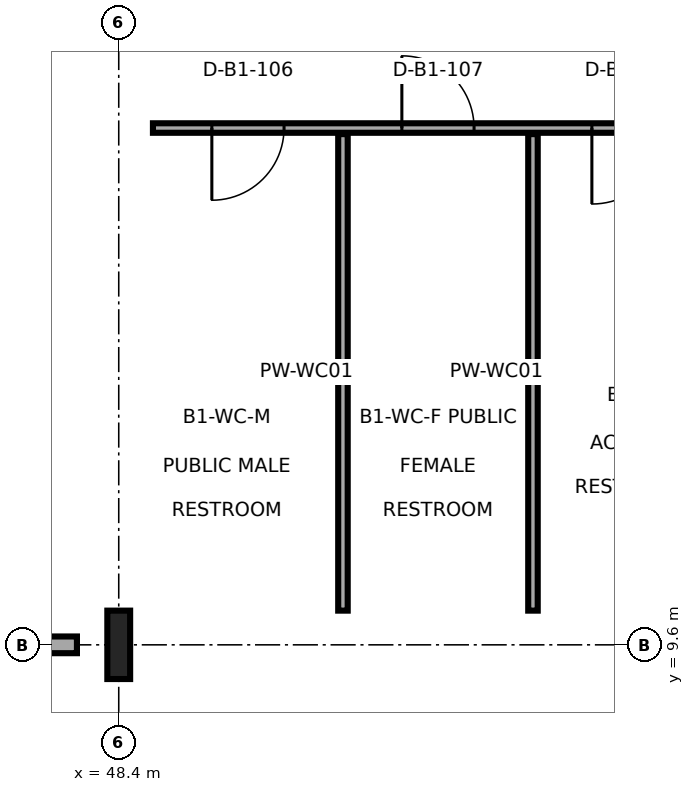
"""IFC4 building model, lengths in metres.
Left out: names, types, materials, properties, quantities, classifications, styles, units other than length and angle.
Written with IfcOpenShell. Run it as: python <this file> out.ifc"""

import sys

from ifc_helpers import new_model, si_unit, direction, frame, frame_2d, origin, origin_2d, place, context, subcontext, project, spatial, rectangle, i_section, extrude, element, fill, save


model = new_model("IFC4")
c1 = context("Model", 3, precision=1e-05, world=origin(), true_north=direction((0.0, 1.0)))
c2 = subcontext(c1, "Body", "Model", "MODEL_VIEW")
j1 = project(units=[si_unit("LENGTHUNIT", "METRE"), si_unit("PLANEANGLEUNIT", "RADIAN")], contexts=[c1])
p1 = place(None, origin())
s1 = spatial("IfcSite", under=j1, at=p1, CompositionType="ELEMENT")
p2 = place(p1, origin())
s2 = spatial("IfcBuilding", under=s1, at=p2, CompositionType="ELEMENT")
p3 = place(p2, frame((0.0, 0.0, -4.8)))
s3 = spatial("IfcBuildingStorey", under=s2, at=p3, CompositionType="ELEMENT", Elevation=-4.8)
p4 = place(p3, frame((48.4, 9.6, 0.0), z_axis=(0.0, 0.0, 1.0), x_axis=(1.0, 0.0, 0.0)))
e1 = element("IfcColumn", 1, at=p4, inside=s3, PredefinedType="COLUMN", context=c2, shape_type="SweptSolid", body=[
    extrude(i_section(OverallWidth=0.3, OverallDepth=0.9, WebThickness=0.019, FlangeThickness=0.035, FilletRadius=0.03, at=origin_2d()), origin(), (0.0, 0.0, 1.0), 4.8),
])
p5 = place(p3, frame((48.85, 16.4, 0.0), z_axis=(0.0, 0.0, 1.0), x_axis=(1.0, 0.0, 0.0)))
e2 = element("IfcWall", 2, at=p5, inside=s3, PredefinedType="PARTITIONING", context=c2, shape_type="SweptSolid", body=[
    extrude(rectangle(XDim=7.5, YDim=0.125, at=frame_2d((3.75, 0.0))), origin(), (0.0, 0.0, 1.0), 4.132),
])
p6 = place(p5, frame((0.775, 0.0, 0.0)))
e3 = element("IfcOpeningElement", 3, at=p6, cuts=e2, PredefinedType="OPENING", context=c2, shape_type="SweptSolid", body=[
    extrude(rectangle(XDim=0.95, YDim=2.1, at=frame_2d((0.475, 1.05))), frame((0.0, 0.073, 0.0), z_axis=(0.0, -1.0, 0.0), x_axis=(1.0, 0.0, 0.0)), (0.0, 0.0, 1.0), 0.145),
])
p7 = place(p5, frame((3.275, 0.0, 0.0)))
e4 = element("IfcOpeningElement", 4, at=p7, cuts=e2, PredefinedType="OPENING", context=c2, shape_type="SweptSolid", body=[
    extrude(rectangle(XDim=0.95, YDim=2.1, at=frame_2d((0.475, 1.05))), frame((0.0, 0.073, 0.0), z_axis=(0.0, -1.0, 0.0), x_axis=(1.0, 0.0, 0.0)), (0.0, 0.0, 1.0), 0.145),
])
p8 = place(p5, frame((5.775, 0.0, 0.0)))
e5 = element("IfcOpeningElement", 5, at=p8, cuts=e2, PredefinedType="OPENING", context=c2, shape_type="SweptSolid", body=[
    extrude(rectangle(XDim=1.0, YDim=2.12, at=frame_2d((0.5, 1.06))), frame((0.0, 0.073, 0.0), z_axis=(0.0, -1.0, 0.0), x_axis=(1.0, 0.0, 0.0)), (0.0, 0.0, 1.0), 0.145),
])
for number, where, z_axis, x_axis in (
    (6, (51.35, 10.05, 0.0), (0.0, 0.0, 1.0), (0.0, 1.0, 0.0)),
    (7, (53.85, 10.05, 0.0), (0.0, 0.0, 1.0), (0.0, 1.0, 0.0)),
):
    element("IfcWall", number, at=place(p3, frame(where, z_axis=z_axis, x_axis=x_axis)), inside=s3, PredefinedType="PARTITIONING", context=c2, shape_type="SweptSolid", body=[
        extrude(rectangle(XDim=6.27, YDim=0.125, at=frame_2d((3.135, 0.0))), origin(), (0.0, 0.0, 1.0), 4.48),
    ])
p9 = place(p3, frame((40.55, 9.6, 0.0), z_axis=(0.0, 0.0, 1.0), x_axis=(1.0, 0.0, 0.0)))
e8 = element("IfcWall", 8, at=p9, inside=s3, PredefinedType="PARTITIONING", context=c2, shape_type="SweptSolid", body=[
    extrude(rectangle(XDim=7.3, YDim=0.22, at=frame_2d((3.65, 0.0))), origin(), (0.0, 0.0, 1.0), 3.832),
])
p10 = place(p9, frame((2.45, 0.0, 0.0)))
e9 = element("IfcOpeningElement", 9, at=p10, cuts=e8, PredefinedType="OPENING", context=c2, shape_type="SweptSolid", body=[
    extrude(rectangle(XDim=2.4, YDim=2.6, at=frame_2d((1.2, 1.3))), frame((0.0, 0.12, 0.0), z_axis=(0.0, -1.0, 0.0), x_axis=(1.0, 0.0, 0.0)), (0.0, 0.0, 1.0), 0.24),
])
p11 = place(p6, frame((0.95, 0.0, 0.0), z_axis=(0.0, 0.0, 1.0), x_axis=(-1.0, 0.0, 0.0)))
e10 = element("IfcDoor", 10, at=p11, inside=s3, OperationType="SINGLE_SWING_RIGHT", PredefinedType="DOOR", context=c2, shape_type="SweptSolid", body=[
    extrude(rectangle(XDim=0.95, YDim=2.1, at=frame_2d((0.475, 1.05))), frame((0.0, 0.025, 0.0), z_axis=(0.0, -1.0, 0.0), x_axis=(1.0, 0.0, 0.0)), (0.0, 0.0, 1.0), 0.05),
])
fill(e3, e10)
p12 = place(p7, frame((0.95, 0.0, 0.0), z_axis=(0.0, 0.0, 1.0), x_axis=(-1.0, 0.0, 0.0)))
e11 = element("IfcDoor", 11, at=p12, inside=s3, OperationType="SINGLE_SWING_LEFT", PredefinedType="DOOR", context=c2, shape_type="SweptSolid", body=[
    extrude(rectangle(XDim=0.95, YDim=2.1, at=frame_2d((0.475, 1.05))), frame((0.0, 0.025, 0.0), z_axis=(0.0, -1.0, 0.0), x_axis=(1.0, 0.0, 0.0)), (0.0, 0.0, 1.0), 0.05),
])
fill(e4, e11)
p13 = place(p8, frame((1.0, 0.0, 0.0), z_axis=(0.0, 0.0, 1.0), x_axis=(-1.0, 0.0, 0.0)))
e12 = element("IfcDoor", 12, at=p13, inside=s3, OperationType="SINGLE_SWING_RIGHT", PredefinedType="DOOR", context=c2, shape_type="SweptSolid", body=[
    extrude(rectangle(XDim=1.0, YDim=2.12, at=frame_2d((0.5, 1.06))), frame((0.0, 0.025, 0.0), z_axis=(0.0, -1.0, 0.0), x_axis=(1.0, 0.0, 0.0)), (0.0, 0.0, 1.0), 0.05),
])
fill(e5, e12)
save(model, sys.argv[1])
